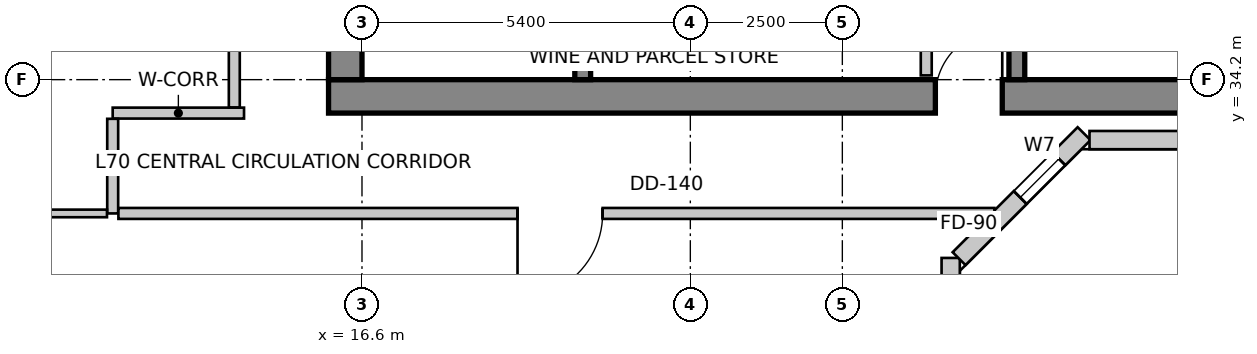
"""IFC4 building model, lengths in metres.
Left out: names, types, materials, properties, quantities, classifications, styles, units other than length and angle.
Written with IfcOpenShell. Run it as: python <this file> out.ifc"""

import sys

from ifc_helpers import new_model, si_unit, direction, frame, frame_2d, origin, place, context, subcontext, project, spatial, rectangle, extrude, source, transform, mapped, element, fill, save


model = new_model("IFC4")
c1 = context("Model", 3, precision=1e-05, world=origin(), true_north=direction((0.0, 1.0)))
c2 = subcontext(c1, "Body", "Model", "MODEL_VIEW")
j1 = project(units=[si_unit("LENGTHUNIT", "METRE"), si_unit("PLANEANGLEUNIT", "RADIAN")], contexts=[c1])
p1 = place(None, origin())
s1 = spatial("IfcSite", under=j1, at=p1, CompositionType="ELEMENT")
p2 = place(p1, origin())
s2 = spatial("IfcBuilding", under=s1, at=p2, CompositionType="ELEMENT")
p3 = place(p2, frame((0.0, 0.0, 274.5)))
s3 = spatial("IfcBuildingStorey", under=s2, at=p3, CompositionType="ELEMENT", Elevation=274.5)
p4 = place(p3, frame((16.05, 33.925, 0.0), z_axis=(0.0, 0.0, 1.0), x_axis=(1.0, 0.0, 0.0)))
e1 = element("IfcWall", 1, at=p4, inside=s3, PredefinedType="SHEAR", context=c2, shape_type="SweptSolid", body=[
    extrude(rectangle(XDim=15.5, YDim=0.55, at=frame_2d((7.75, 0.0))), origin(), (0.0, 0.0, 1.0), 3.6),
])
m1 = source(origin(), c2, "Body", "SweptSolid", [
    extrude(rectangle(XDim=1.1, YDim=2.15, at=frame_2d((0.55, 1.075))), frame((0.0, 0.285, 0.0), z_axis=(0.0, -1.0, 0.0), x_axis=(1.0, 0.0, 0.0)), (0.0, 0.0, 1.0), 0.57),
])
p5 = place(p4, frame((9.98, 0.0, 0.0)))
e2 = element("IfcOpeningElement", 2, at=p5, cuts=e1, PredefinedType="OPENING", context=c2, shape_type="MappedRepresentation", body=[
    mapped(m1, transform((0.0, 0.0, 0.0), scale=1.0)),
])
p6 = place(p3, frame((16.325, 34.2, 0.0), z_axis=(0.0, 0.0, 1.0), x_axis=(0.0, 1.0, 0.0)))
e3 = element("IfcWall", 3, at=p6, inside=s3, PredefinedType="SHEAR", context=c2, shape_type="SweptSolid", body=[
    extrude(rectangle(XDim=11.4, YDim=0.55, at=frame_2d((5.7, 0.0))), origin(), (0.0, 0.0, 1.0), 3.6),
])
p7 = place(p6, frame((7.15, 0.0, 0.0)))
e4 = element("IfcOpeningElement", 4, at=p7, cuts=e3, PredefinedType="OPENING", context=c2, shape_type="MappedRepresentation", body=[
    mapped(m1, transform((0.0, 0.0, 0.0), scale=1.0)),
])
p8 = place(p3, frame((20.23, 34.2, 0.0), z_axis=(0.0, 0.0, 1.0), x_axis=(0.0, 1.0, 0.0)))
e5 = element("IfcWall", 5, at=p8, inside=s3, PredefinedType="SHEAR", context=c2, shape_type="SweptSolid", body=[
    extrude(rectangle(XDim=9.06, YDim=0.26, at=frame_2d((4.53, 0.0))), origin(), (0.0, 0.0, 1.0), 3.6),
])
m2 = source(origin(), c2, "Body", "SweptSolid", [
    extrude(rectangle(XDim=1.1, YDim=2.15, at=frame_2d((0.55, 1.075))), frame((0.0, 0.14, 0.0), z_axis=(0.0, -1.0, 0.0), x_axis=(1.0, 0.0, 0.0)), (0.0, 0.0, 1.0), 0.28),
])
p9 = place(p8, frame((7.45, 0.0, 0.0)))
e6 = element("IfcOpeningElement", 6, at=p9, cuts=e5, PredefinedType="OPENING", context=c2, shape_type="MappedRepresentation", body=[
    mapped(m2, transform((0.0, 0.0, 0.0), scale=1.0)),
])
p10 = place(p3, frame((27.37, 34.2, 0.0), z_axis=(0.0, 0.0, 1.0), x_axis=(0.0, 1.0, 0.0)))
e7 = element("IfcWall", 7, at=p10, inside=s3, PredefinedType="SHEAR", context=c2, shape_type="SweptSolid", body=[
    extrude(rectangle(XDim=9.06, YDim=0.26, at=frame_2d((4.53, 0.0))), origin(), (0.0, 0.0, 1.0), 3.6),
])
p11 = place(p10, frame((7.45, 0.0, 0.0)))
e8 = element("IfcOpeningElement", 8, at=p11, cuts=e7, PredefinedType="OPENING", context=c2, shape_type="MappedRepresentation", body=[
    mapped(m2, transform((0.0, 0.0, 0.0), scale=1.0)),
])
p12 = place(p3, frame((26.282, 21.557, 0.0), z_axis=(0.0, 0.0, 1.0), x_axis=(0.0, 1.0, 0.0)))
e9 = element("IfcWall", 9, at=p12, inside=s3, PredefinedType="SOLIDWALL", context=c2, shape_type="SweptSolid", body=[
    extrude(rectangle(XDim=9.711, YDim=0.3, at=frame_2d((4.855, 0.0))), origin(), (0.0, 0.0, 1.0), 3.35),
])
m3 = source(origin(), c2, "Body", "SweptSolid", [
    extrude(rectangle(XDim=2.4, YDim=2.2, at=frame_2d((1.2, 1.1))), frame((0.0, 0.16, 0.0), z_axis=(0.0, -1.0, 0.0), x_axis=(1.0, 0.0, 0.0)), (0.0, 0.0, 1.0), 0.32),
])
p13 = place(p12, frame((0.354, 0.0, 0.85)))
e10 = element("IfcOpeningElement", 10, at=p13, cuts=e9, PredefinedType="OPENING", context=c2, shape_type="MappedRepresentation", body=[
    mapped(m3, transform((0.0, 0.0, 0.0), scale=1.0)),
])
p14 = place(p12, frame((5.109, 0.0, 0.85)))
e11 = element("IfcOpeningElement", 11, at=p14, cuts=e9, PredefinedType="OPENING", context=c2, shape_type="MappedRepresentation", body=[
    mapped(m3, transform((0.0, 0.0, 0.0), scale=1.0)),
])
p15 = place(p3, frame((26.42, 31.256, 0.0), z_axis=(0.0, 0.0, 1.0), x_axis=(0.707106781187, 0.707106781187, 0.0)))
e12 = element("IfcWall", 12, at=p15, inside=s3, PredefinedType="SOLIDWALL", context=c2, shape_type="SweptSolid", body=[
    extrude(rectangle(XDim=2.907, YDim=0.3, at=frame_2d((1.454, 0.0))), origin(), (0.0, 0.0, 1.0), 3.35),
])
m4 = source(origin(), c2, "Body", "SweptSolid", [
    extrude(rectangle(XDim=0.9, YDim=1.6, at=frame_2d((0.45, 0.8))), frame((0.0, 0.16, 0.0), z_axis=(0.0, -1.0, 0.0), x_axis=(1.0, 0.0, 0.0)), (0.0, 0.0, 1.0), 0.32),
])
p16 = place(p15, frame((1.422, 0.0, 0.85)))
e13 = element("IfcOpeningElement", 13, at=p16, cuts=e12, PredefinedType="OPENING", context=c2, shape_type="MappedRepresentation", body=[
    mapped(m4, transform((0.0, 0.0, 0.0), scale=1.0)),
])
p17 = place(p3, frame((28.565, 33.206, 0.0), z_axis=(0.0, 0.0, 1.0), x_axis=(1.0, 0.0, 0.0)))
e14 = element("IfcWall", 14, at=p17, inside=s3, PredefinedType="SOLIDWALL", context=c2, shape_type="SweptSolid", body=[
    extrude(rectangle(XDim=13.423, YDim=0.3, at=frame_2d((6.711, 0.0))), origin(), (0.0, 0.0, 1.0), 3.35),
])
m5 = source(origin(), c2, "Body", "SweptSolid", [
    extrude(rectangle(XDim=1.6, YDim=2.15, at=frame_2d((0.8, 1.075))), frame((0.0, 0.16, 0.0), z_axis=(0.0, -1.0, 0.0), x_axis=(1.0, 0.0, 0.0)), (0.0, 0.0, 1.0), 0.32),
])
p18 = place(p17, frame((5.635, 0.0, 0.0)))
e15 = element("IfcOpeningElement", 15, at=p18, cuts=e14, PredefinedType="OPENING", context=c2, shape_type="MappedRepresentation", body=[
    mapped(m5, transform((0.0, 0.0, 0.0), scale=1.0)),
])
p19 = place(p17, frame((1.637, 0.0, 0.85)))
e16 = element("IfcOpeningElement", 16, at=p19, cuts=e14, PredefinedType="OPENING", context=c2, shape_type="MappedRepresentation", body=[
    mapped(m3, transform((0.0, 0.0, 0.0), scale=1.0)),
])
p20 = place(p17, frame((9.109, 0.0, 0.85)))
e17 = element("IfcOpeningElement", 17, at=p20, cuts=e14, PredefinedType="OPENING", context=c2, shape_type="MappedRepresentation", body=[
    mapped(m3, transform((0.0, 0.0, 0.0), scale=1.0)),
])
p21 = place(p3, frame((25.88, 35.956, 0.0), z_axis=(0.0, 0.0, 1.0), x_axis=(0.0, -1.0, 0.0)))
e18 = element("IfcWall", 18, at=p21, inside=s3, PredefinedType="PARTITIONING", context=c2, shape_type="SweptSolid", body=[
    extrude(rectangle(XDim=1.686, YDim=0.18, at=frame_2d((0.843, 0.0))), origin(), (0.0, 0.0, 1.0), 2.642),
])
p22 = place(p3, frame((12.5, 33.65, 0.0), z_axis=(0.0, 0.0, 1.0), x_axis=(1.0, 0.0, 0.0)))
e19 = element("IfcWall", 19, at=p22, inside=s3, PredefinedType="PARTITIONING", context=c2, shape_type="SweptSolid", body=[
    extrude(rectangle(XDim=2.16, YDim=0.18, at=frame_2d((1.08, 0.0))), origin(), (0.0, 0.0, 1.0), 3.35),
])
p23 = place(p3, frame((12.5, 32.0, 0.0), z_axis=(0.0, 0.0, 1.0), x_axis=(0.0, 1.0, 0.0)))
e20 = element("IfcWall", 20, at=p23, inside=s3, PredefinedType="PARTITIONING", context=c2, shape_type="SweptSolid", body=[
    extrude(rectangle(XDim=1.556, YDim=0.18, at=frame_2d((0.778, 0.0))), origin(), (0.0, 0.0, 1.0), 3.019),
])
p24 = place(p3, frame((27.001, 32.0, 0.0), z_axis=(0.0, 0.0, 1.0), x_axis=(-1.0, 0.0, 0.0)))
e21 = element("IfcWall", 21, at=p24, inside=s3, PredefinedType="PARTITIONING", context=c2, shape_type="SweptSolid", body=[
    extrude(rectangle(XDim=14.407, YDim=0.18, at=frame_2d((7.204, 0.0))), origin(), (0.0, 0.0, 1.0), 3.019),
])
m6 = source(origin(), c2, "Body", "SweptSolid", [
    extrude(rectangle(XDim=1.4, YDim=2.15, at=frame_2d((0.7, 1.075))), frame((0.0, 0.1, 0.0), z_axis=(0.0, -1.0, 0.0), x_axis=(1.0, 0.0, 0.0)), (0.0, 0.0, 1.0), 0.2),
])
p25 = place(p24, frame((6.443, 0.0, 0.0)))
e22 = element("IfcOpeningElement", 22, at=p25, cuts=e21, PredefinedType="OPENING", context=c2, shape_type="MappedRepresentation", body=[
    mapped(m6, transform((0.0, 0.0, 0.0), scale=1.0)),
])
p26 = place(p3, frame((14.5, 33.744, 0.0), z_axis=(0.0, 0.0, 1.0), x_axis=(0.0, 1.0, 0.0)))
e23 = element("IfcWall", 23, at=p26, inside=s3, PredefinedType="PARTITIONING", context=c2, shape_type="SweptSolid", body=[
    extrude(rectangle(XDim=12.406, YDim=0.18, at=frame_2d((6.203, 0.0))), origin(), (0.0, 0.0, 1.0), 3.35),
])
m7 = source(origin(), c2, "Body", "SweptSolid", [
    extrude(rectangle(XDim=0.9, YDim=2.15, at=frame_2d((0.45, 1.075))), frame((0.0, 0.1, 0.0), z_axis=(0.0, -1.0, 0.0), x_axis=(1.0, 0.0, 0.0)), (0.0, 0.0, 1.0), 0.2),
])
p27 = place(p26, frame((4.37, 0.0, 0.0)))
e24 = element("IfcOpeningElement", 24, at=p27, cuts=e23, PredefinedType="OPENING", context=c2, shape_type="MappedRepresentation", body=[
    mapped(m7, transform((0.0, 0.0, 0.0), scale=1.0)),
])
p28 = place(p3, frame((12.406, 32.0, 0.0), z_axis=(0.0, 0.0, 1.0), x_axis=(-1.0, 0.0, 0.0)))
e25 = element("IfcWall", 25, at=p28, inside=s3, PredefinedType="PARTITIONING", context=c2, shape_type="SweptSolid", body=[
    extrude(rectangle(XDim=4.126, YDim=0.125, at=frame_2d((2.063, 0.0))), origin(), (0.0, 0.0, 1.0), 2.642),
])
m8 = source(origin(), c2, "Body", "SweptSolid", [
    extrude(rectangle(XDim=0.9, YDim=1.6, at=frame_2d((0.45, 0.8))), frame((0.0, -0.015, 0.0), z_axis=(0.0, -1.0, 0.0), x_axis=(1.0, 0.0, 0.0)), (0.0, 0.0, 1.0), 0.06),
])
p29 = place(p16, origin())
e26 = element("IfcWindow", 26, at=p29, inside=s3, PartitioningType="SINGLE_PANEL", PredefinedType="WINDOW", context=c2, shape_type="MappedRepresentation", body=[
    mapped(m8, transform((0.0, 0.0, 0.0), scale=1.0)),
])
fill(e13, e26)
m9 = source(origin(), c2, "Body", "SweptSolid", [
    extrude(rectangle(XDim=1.1, YDim=2.15, at=frame_2d((0.55, 1.075))), frame((0.0, 0.025, 0.0), z_axis=(0.0, -1.0, 0.0), x_axis=(1.0, 0.0, 0.0)), (0.0, 0.0, 1.0), 0.05),
])
p30 = place(p5, origin())
e27 = element("IfcDoor", 27, at=p30, inside=s3, OperationType="SINGLE_SWING_RIGHT", PredefinedType="DOOR", context=c2, shape_type="MappedRepresentation", body=[
    mapped(m9, transform((0.0, 0.0, 0.0), scale=1.0)),
])
fill(e2, e27)
m10 = source(origin(), c2, "Body", "SweptSolid", [
    extrude(rectangle(XDim=1.4, YDim=2.15, at=frame_2d((0.7, 1.075))), frame((0.0, 0.025, 0.0), z_axis=(0.0, -1.0, 0.0), x_axis=(1.0, 0.0, 0.0)), (0.0, 0.0, 1.0), 0.05),
])
p31 = place(p25, origin())
e28 = element("IfcDoor", 28, at=p31, inside=s3, OperationType="SINGLE_SWING_RIGHT", PredefinedType="DOOR", context=c2, shape_type="MappedRepresentation", body=[
    mapped(m10, transform((0.0, 0.0, 0.0), scale=1.0)),
])
fill(e22, e28)
save(model, sys.argv[1])
